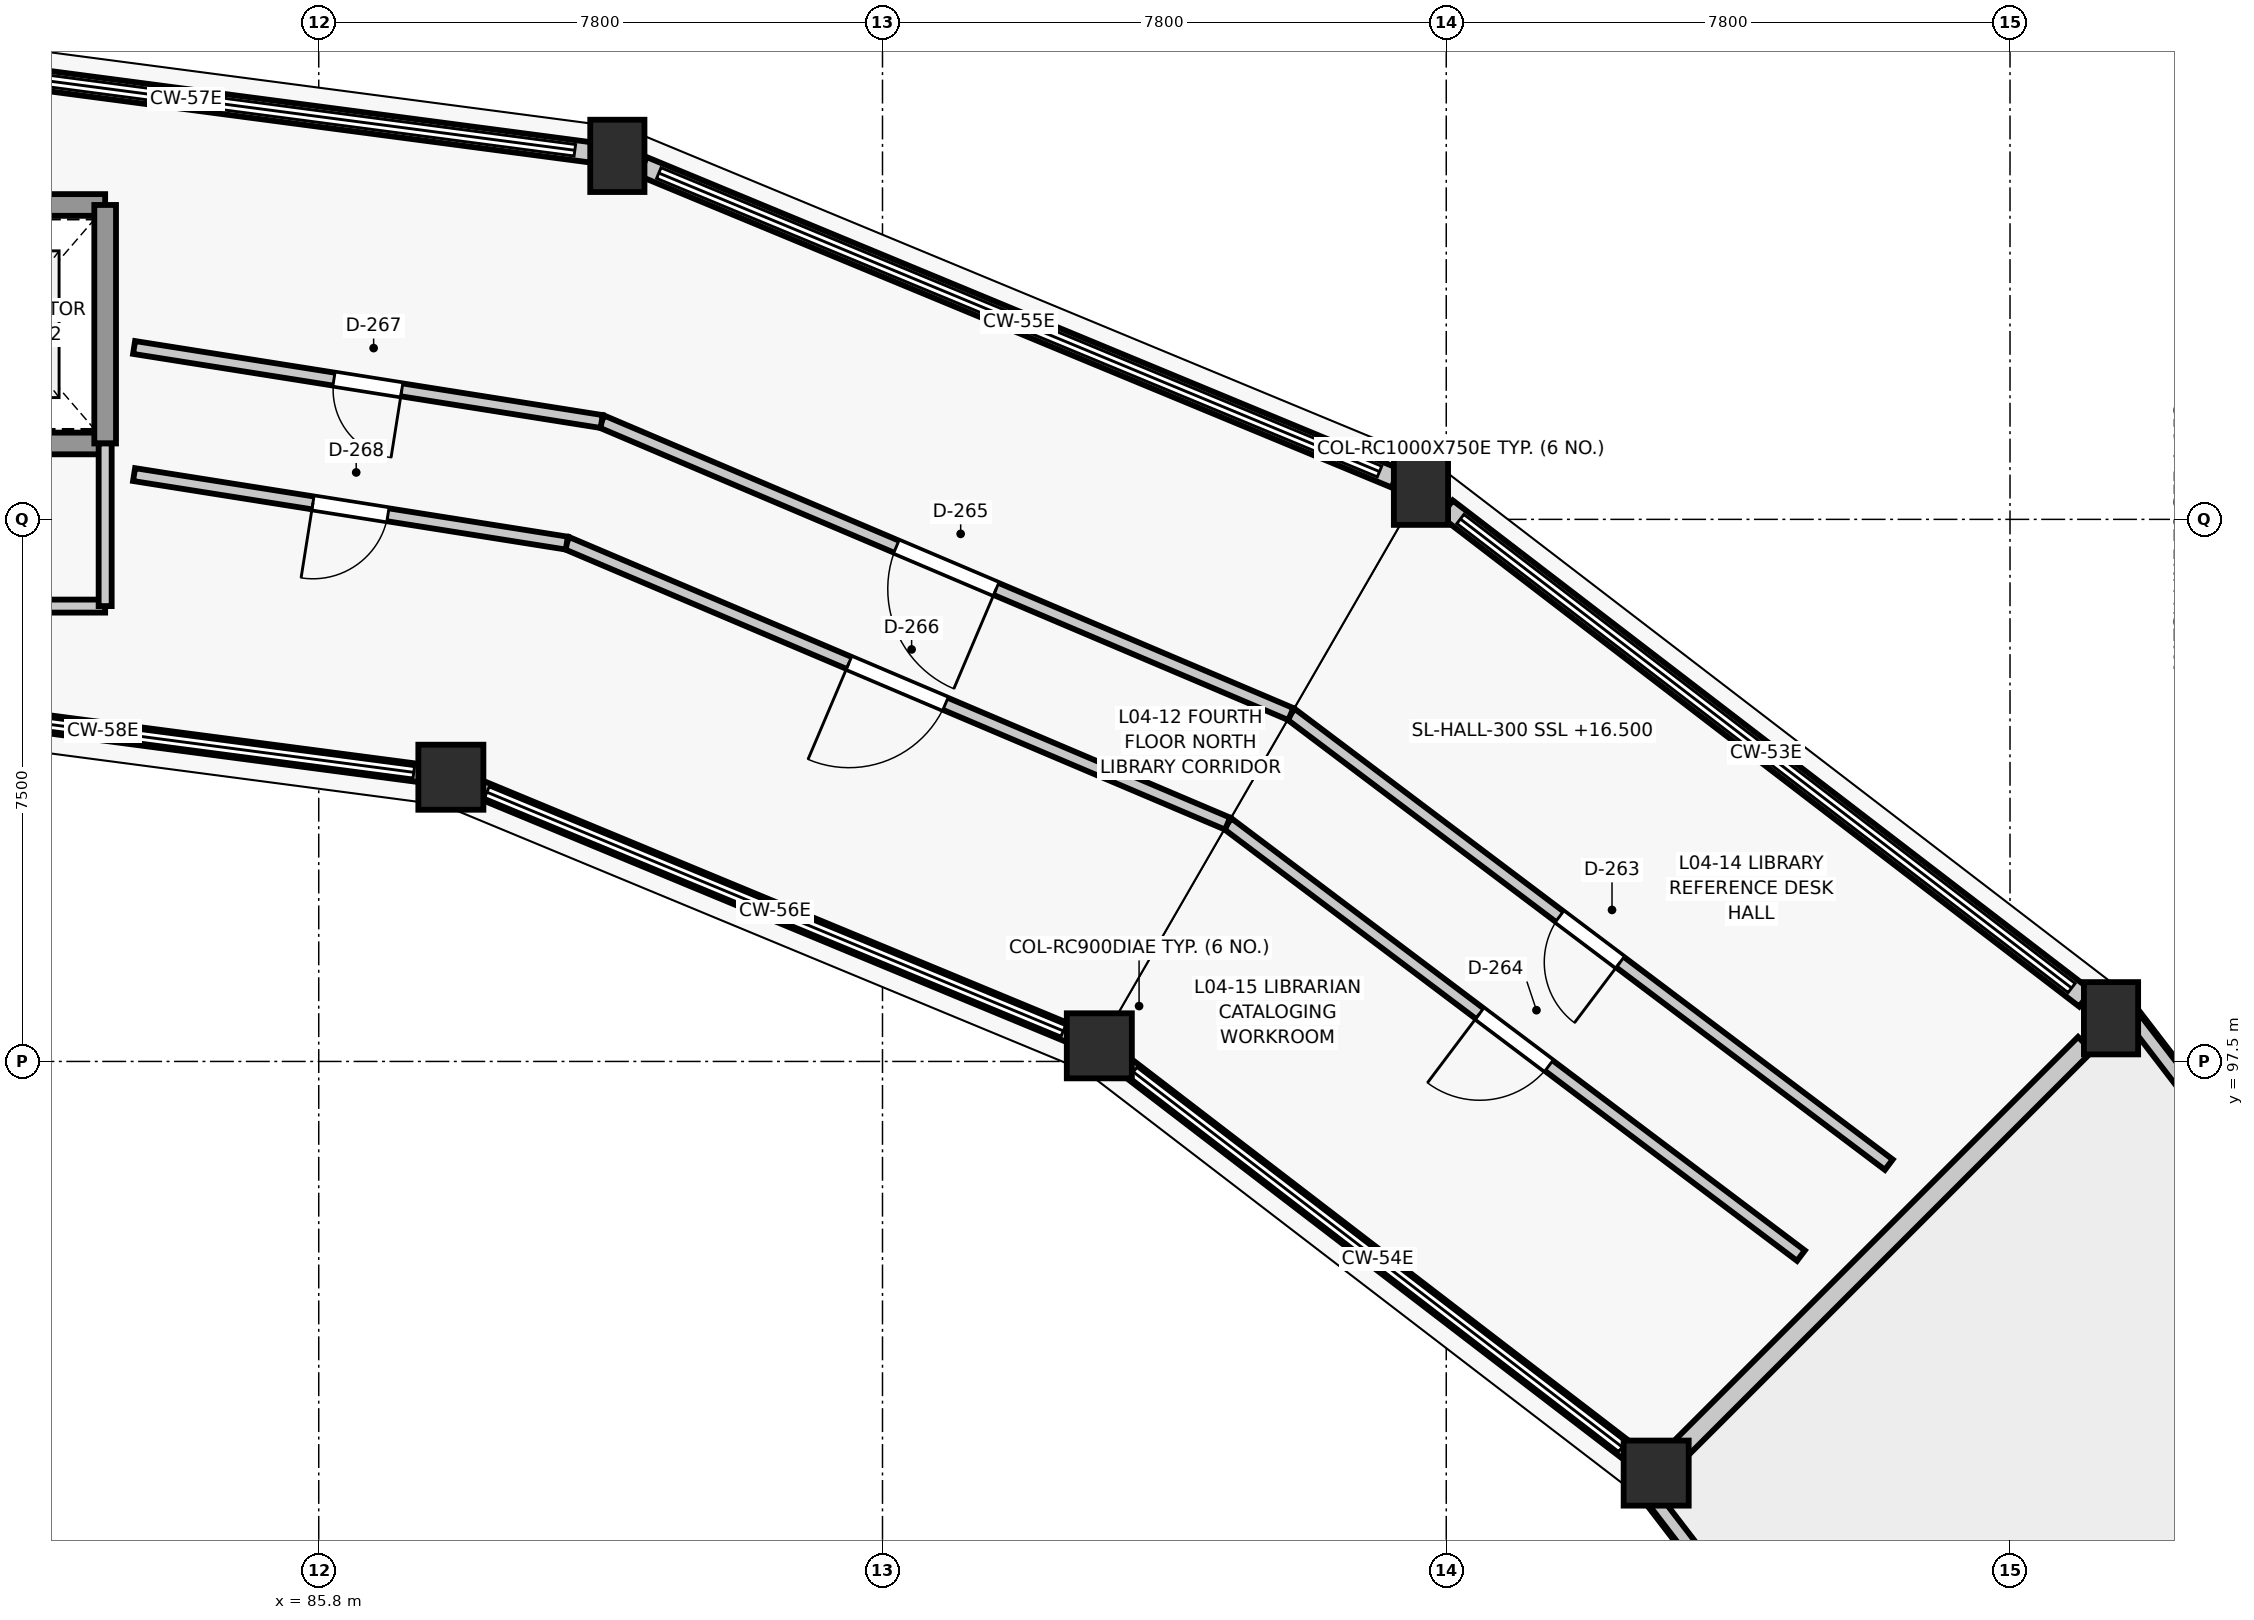
"""IFC4 building model, lengths in metres.
Left out: names, types, materials, properties, quantities, classifications, styles, units other than length and angle.
Written with IfcOpenShell. Run it as: python <this file> out.ifc"""

import sys

from ifc_helpers import new_model, si_unit, direction, frame, frame_2d, origin, origin_2d, place, context, subcontext, project, spatial, rectangle, circle, extrude, element, fill, save


model = new_model("IFC4")
c1 = context("Model", 3, precision=1e-05, world=origin(), true_north=direction((0.0, 1.0)))
c2 = subcontext(c1, "Body", "Model", "MODEL_VIEW")
j1 = project(units=[si_unit("LENGTHUNIT", "METRE"), si_unit("PLANEANGLEUNIT", "RADIAN")], contexts=[c1])
p1 = place(None, origin())
s1 = spatial("IfcSite", under=j1, at=p1, CompositionType="ELEMENT")
p2 = place(p1, origin())
s2 = spatial("IfcBuilding", under=s1, at=p2, CompositionType="ELEMENT")
p3 = place(p2, frame((0.0, 0.0, 16.5)))
s3 = spatial("IfcBuildingStorey", under=s2, at=p3, CompositionType="ELEMENT", Elevation=16.5)
for number, where, z_axis, x_axis in (
    (1, (96.6, 97.716, 0.0), (0.0, 0.0, 1.0), (1.0, 0.0, 0.0)),
    (2, (87.628, 101.432, 0.0), (0.0, 0.0, 1.0), (1.0, 0.0, 0.0)),
):
    element("IfcColumn", number, at=place(p3, frame(where, z_axis=z_axis, x_axis=x_axis)), inside=s3, PredefinedType="COLUMN", context=c2, shape_type="SweptSolid", body=[
        extrude(circle(Radius=0.45, at=origin_2d()), origin(), (0.0, 0.0, 1.0), 3.9),
    ])
for number, where, z_axis, x_axis in (
    (3, (101.05, 105.424, 0.0), (0.0, 0.0, 1.0), (1.0, 0.0, 0.0)),
    (4, (89.932, 110.029, 0.0), (0.0, 0.0, 1.0), (1.0, 0.0, 0.0)),
    (5, (110.598, 98.098, 0.0), (0.0, 0.0, 1.0), (1.0, 0.0, 0.0)),
):
    element("IfcColumn", number, at=place(p3, frame(where, z_axis=z_axis, x_axis=x_axis)), inside=s3, PredefinedType="COLUMN", context=c2, shape_type="SweptSolid", body=[
        extrude(rectangle(XDim=0.75, YDim=1.0, at=origin_2d()), origin(), (0.0, 0.0, 1.0), 3.9),
    ])
p4 = place(p3, frame((104.304, 91.804, 0.0), z_axis=(0.0, 0.0, 1.0), x_axis=(1.0, 0.0, 0.0)))
e6 = element("IfcColumn", 6, at=p4, inside=s3, PredefinedType="COLUMN", context=c2, shape_type="SweptSolid", body=[
    extrude(circle(Radius=0.45, at=origin_2d()), origin(), (0.0, 0.0, 1.0), 3.9),
])
p5 = place(p3, frame((101.405, 105.151, 0.0), z_axis=(0.0, 0.0, 1.0), x_axis=(0.793342066679, -0.608776120785, 0.0)))
e7 = element("IfcWall", 7, at=p5, inside=s3, PredefinedType="STANDARD", context=c2, shape_type="SweptSolid", body=[
    extrude(rectangle(XDim=11.139, YDim=0.28, at=frame_2d((5.57, 0.0))), origin(), (0.0, 0.0, 1.0), 0.82),
])
p6 = place(p3, frame((104.024, 92.019, 0.0), z_axis=(0.0, 0.0, 1.0), x_axis=(-0.793347085527, 0.608769580289, 0.0)))
e8 = element("IfcWall", 8, at=p6, inside=s3, PredefinedType="STANDARD", context=c2, shape_type="SweptSolid", body=[
    extrude(rectangle(XDim=9.005, YDim=0.25, at=frame_2d((4.502, 0.0))), origin(), (0.0, 0.0, 1.0), 0.82),
])
p7 = place(p3, frame((90.283, 109.883, 0.0), z_axis=(0.0, 0.0, 1.0), x_axis=(0.923883530636, -0.382673779896, 0.0)))
e9 = element("IfcWall", 9, at=p7, inside=s3, PredefinedType="STANDARD", context=c2, shape_type="SweptSolid", body=[
    extrude(rectangle(XDim=11.272, YDim=0.28, at=frame_2d((5.636, 0.0))), origin(), (0.0, 0.0, 1.0), 0.82),
])
p8 = place(p3, frame((96.323, 97.831, 0.0), z_axis=(0.0, 0.0, 1.0), x_axis=(-0.923880324771, 0.382681519675, 0.0)))
e10 = element("IfcWall", 10, at=p8, inside=s3, PredefinedType="STANDARD", context=c2, shape_type="SweptSolid", body=[
    extrude(rectangle(XDim=9.112, YDim=0.25, at=frame_2d((4.556, 0.0))), origin(), (0.0, 0.0, 1.0), 0.82),
])
p9 = place(p3, frame((78.35, 111.554, 0.0), z_axis=(0.0, 0.0, 1.0), x_axis=(0.991443215359, -0.130538694334, 0.0)))
e11 = element("IfcWall", 11, at=p9, inside=s3, PredefinedType="STANDARD", context=c2, shape_type="SweptSolid", body=[
    extrude(rectangle(XDim=11.328, YDim=0.28, at=frame_2d((5.664, 0.0))), origin(), (0.0, 0.0, 1.0), 0.82),
])
p10 = place(p3, frame((87.353, 101.469, 0.0), z_axis=(0.0, 0.0, 1.0), x_axis=(-0.991441766434, 0.130549698469, 0.0)))
e12 = element("IfcWall", 12, at=p10, inside=s3, PredefinedType="STANDARD", context=c2, shape_type="SweptSolid", body=[
    extrude(rectangle(XDim=9.156, YDim=0.25, at=frame_2d((4.578, 0.0))), origin(), (0.0, 0.0, 1.0), 0.82),
])
p11 = place(p3, frame((110.24, 97.74, 0.0), z_axis=(0.0, 0.0, 1.0), x_axis=(-0.707106781187, -0.707106781187, 0.0)))
e13 = element("IfcWall", 13, at=p11, inside=s3, PredefinedType="STANDARD", context=c2, shape_type="SweptSolid", body=[
    extrude(rectangle(XDim=7.995, YDim=0.28, at=frame_2d((3.998, 0.0))), origin(), (0.0, 0.0, 1.0), 2.997),
])
p12 = place(p3, frame((118.14, 88.675, 0.0), z_axis=(0.0, 0.0, 1.0), x_axis=(-0.608767399899, 0.79334875863, 0.0)))
e14 = element("IfcWall", 14, at=p12, inside=s3, PredefinedType="PARAPET", context=c2, shape_type="SweptSolid", body=[
    extrude(rectangle(XDim=12.1, YDim=0.2, at=frame_2d((6.05, 0.0))), origin(), (0.0, 0.0, 1.0), 1.12),
])
p13 = place(p3, frame((110.0, 83.975, 0.0), z_axis=(0.0, 0.0, 1.0), x_axis=(-0.608747657728, 0.793363907176, 0.0)))
e15 = element("IfcWall", 15, at=p13, inside=s3, PredefinedType="PARAPET", context=c2, shape_type="SweptSolid", body=[
    extrude(rectangle(XDim=9.646, YDim=0.2, at=frame_2d((4.823, 0.0))), origin(), (0.0, 0.0, 1.0), 1.12),
])
p14 = place(p3, frame((82.845, 106.05, 0.0), z_axis=(0.0, 0.0, 1.0), x_axis=(-1.0, 0.0, 0.0)))
e16 = element("IfcWall", 16, at=p14, inside=s3, PredefinedType="SHEAR", context=c2, shape_type="SweptSolid", body=[
    extrude(rectangle(XDim=9.69, YDim=0.3, at=frame_2d((4.845, 0.0))), origin(), (0.0, 0.0, 1.0), 3.9),
])
p15 = place(p14, frame((8.245, 0.0, 0.0)))
e17 = element("IfcOpeningElement", 17, at=p15, cuts=e16, PredefinedType="OPENING", context=c2, shape_type="SweptSolid", body=[
    extrude(rectangle(XDim=1.15, YDim=2.15, at=frame_2d((0.575, 1.075))), frame((0.0, 0.16, 0.0), z_axis=(0.0, -1.0, 0.0), x_axis=(1.0, 0.0, 0.0)), (0.0, 0.0, 1.0), 0.32),
])
p16 = place(p14, frame((0.85, 0.0, 0.0)))
e18 = element("IfcOpeningElement", 18, at=p16, cuts=e16, PredefinedType="OPENING", context=c2, shape_type="SweptSolid", body=[
    extrude(rectangle(XDim=1.1, YDim=2.15, at=frame_2d((0.55, 1.075))), frame((0.0, 0.16, 0.0), z_axis=(0.0, -1.0, 0.0), x_axis=(1.0, 0.0, 0.0)), (0.0, 0.0, 1.0), 0.32),
])
p17 = place(p3, frame((73.155, 109.35, 0.0), z_axis=(0.0, 0.0, 1.0), x_axis=(1.0, 0.0, 0.0)))
e19 = element("IfcWall", 19, at=p17, inside=s3, PredefinedType="SHEAR", context=c2, shape_type="SweptSolid", body=[
    extrude(rectangle(XDim=9.69, YDim=0.3, at=frame_2d((4.845, 0.0))), origin(), (0.0, 0.0, 1.0), 3.9),
])
p18 = place(p3, frame((82.845, 109.35, 0.0), z_axis=(0.0, 0.0, 1.0), x_axis=(0.0, -1.0, 0.0)))
e20 = element("IfcWall", 20, at=p18, inside=s3, PredefinedType="SHEAR", context=c2, shape_type="SweptSolid", body=[
    extrude(rectangle(XDim=3.3, YDim=0.3, at=frame_2d((1.65, 0.0))), origin(), (0.0, 0.0, 1.0), 3.9),
])
p19 = place(p3, frame((73.155, 103.8, 0.0), z_axis=(0.0, 0.0, 1.0), x_axis=(1.0, 0.0, 0.0)))
e21 = element("IfcWall", 21, at=p19, inside=s3, PredefinedType="PARTITIONING", context=c2, shape_type="SweptSolid", body=[
    extrude(rectangle(XDim=9.69, YDim=0.18, at=frame_2d((4.845, 0.0))), origin(), (0.0, 0.0, 1.0), 3.635),
])
p20 = place(p19, frame((1.1, 0.0, 0.0)))
e22 = element("IfcOpeningElement", 22, at=p20, cuts=e21, PredefinedType="OPENING", context=c2, shape_type="SweptSolid", body=[
    extrude(rectangle(XDim=1.5, YDim=2.15, at=frame_2d((0.75, 1.075))), frame((0.0, 0.1, 0.0), z_axis=(0.0, -1.0, 0.0), x_axis=(1.0, 0.0, 0.0)), (0.0, 0.0, 1.0), 0.2),
])
p21 = place(p3, frame((82.845, 106.05, 0.0), z_axis=(0.0, 0.0, 1.0), x_axis=(0.0, -1.0, 0.0)))
e23 = element("IfcWall", 23, at=p21, inside=s3, PredefinedType="PARTITIONING", context=c2, shape_type="SweptSolid", body=[
    extrude(rectangle(XDim=2.25, YDim=0.18, at=frame_2d((1.125, 0.0))), origin(), (0.0, 0.0, 1.0), 3.635),
])
p22 = place(p3, frame((107.523, 96.072, 0.0), z_axis=(0.0, 0.0, 1.0), x_axis=(-0.798634745904, 0.601816037203, 0.0)))
e24 = element("IfcWall", 24, at=p22, inside=s3, PredefinedType="PARTITIONING", context=c2, shape_type="SweptSolid", body=[
    extrude(rectangle(XDim=10.359, YDim=0.18, at=frame_2d((5.179, 0.0))), origin(), (0.0, 0.0, 1.0), 3.635),
])
p23 = place(p22, frame((4.655, 0.0, 0.0)))
e25 = element("IfcOpeningElement", 25, at=p23, cuts=e24, PredefinedType="OPENING", context=c2, shape_type="SweptSolid", body=[
    extrude(rectangle(XDim=1.05, YDim=2.1, at=frame_2d((0.525, 1.05))), frame((0.0, 0.1, 0.0), z_axis=(0.0, -1.0, 0.0), x_axis=(1.0, 0.0, 0.0)), (0.0, 0.0, 1.0), 0.2),
])
p24 = place(p3, frame((106.307, 94.813, 0.0), z_axis=(0.0, 0.0, 1.0), x_axis=(-0.798632256967, 0.601819340112, 0.0)))
e26 = element("IfcWall", 26, at=p24, inside=s3, PredefinedType="PARTITIONING", context=c2, shape_type="SweptSolid", body=[
    extrude(rectangle(XDim=9.932, YDim=0.18, at=frame_2d((4.966, 0.0))), origin(), (0.0, 0.0, 1.0), 3.635),
])
p25 = place(p24, frame((4.366, 0.0, 0.0)))
e27 = element("IfcOpeningElement", 27, at=p25, cuts=e26, PredefinedType="OPENING", context=c2, shape_type="SweptSolid", body=[
    extrude(rectangle(XDim=1.2, YDim=2.15, at=frame_2d((0.6, 1.075))), frame((0.0, 0.1, 0.0), z_axis=(0.0, -1.0, 0.0), x_axis=(1.0, 0.0, 0.0)), (0.0, 0.0, 1.0), 0.2),
])
p26 = place(p3, frame((99.25, 102.306, 0.0), z_axis=(0.0, 0.0, 1.0), x_axis=(-0.920510896456, 0.390716891759, 0.0)))
e28 = element("IfcWall", 28, at=p26, inside=s3, PredefinedType="PARTITIONING", context=c2, shape_type="SweptSolid", body=[
    extrude(rectangle(XDim=10.359, YDim=0.18, at=frame_2d((5.179, 0.0))), origin(), (0.0, 0.0, 1.0), 3.635),
])
p27 = place(p26, frame((4.429, 0.0, 0.0)))
e29 = element("IfcOpeningElement", 29, at=p27, cuts=e28, PredefinedType="OPENING", context=c2, shape_type="SweptSolid", body=[
    extrude(rectangle(XDim=1.5, YDim=2.15, at=frame_2d((0.75, 1.075))), frame((0.0, 0.1, 0.0), z_axis=(0.0, -1.0, 0.0), x_axis=(1.0, 0.0, 0.0)), (0.0, 0.0, 1.0), 0.2),
])
p28 = place(p3, frame((98.375, 100.791, 0.0), z_axis=(0.0, 0.0, 1.0), x_axis=(-0.920506244917, 0.390727850388, 0.0)))
e30 = element("IfcWall", 30, at=p28, inside=s3, PredefinedType="PARTITIONING", context=c2, shape_type="SweptSolid", body=[
    extrude(rectangle(XDim=9.932, YDim=0.18, at=frame_2d((4.966, 0.0))), origin(), (0.0, 0.0, 1.0), 3.635),
])
p29 = place(p28, frame((4.241, 0.0, 0.0)))
e31 = element("IfcOpeningElement", 31, at=p29, cuts=e30, PredefinedType="OPENING", context=c2, shape_type="SweptSolid", body=[
    extrude(rectangle(XDim=1.45, YDim=2.2, at=frame_2d((0.725, 1.1))), frame((0.0, 0.1, 0.0), z_axis=(0.0, -1.0, 0.0), x_axis=(1.0, 0.0, 0.0)), (0.0, 0.0, 1.0), 0.2),
])
p30 = place(p3, frame((89.715, 106.354, 0.0), z_axis=(0.0, 0.0, 1.0), x_axis=(-0.987682749699, 0.15646976049, 0.0)))
e32 = element("IfcWall", 32, at=p30, inside=s3, PredefinedType="PARTITIONING", context=c2, shape_type="SweptSolid", body=[
    extrude(rectangle(XDim=6.55, YDim=0.18, at=frame_2d((3.275, 0.0))), origin(), (0.0, 0.0, 1.0), 3.635),
])
p31 = place(p30, frame((2.8, 0.0, 0.0)))
e33 = element("IfcOpeningElement", 33, at=p31, cuts=e32, PredefinedType="OPENING", context=c2, shape_type="SweptSolid", body=[
    extrude(rectangle(XDim=0.95, YDim=2.1, at=frame_2d((0.475, 1.05))), frame((0.0, 0.1, 0.0), z_axis=(0.0, -1.0, 0.0), x_axis=(1.0, 0.0, 0.0)), (0.0, 0.0, 1.0), 0.2),
])
p32 = place(p3, frame((89.232, 104.671, 0.0), z_axis=(0.0, 0.0, 1.0), x_axis=(-0.987688724115, 0.15643204357, 0.0)))
e34 = element("IfcWall", 34, at=p32, inside=s3, PredefinedType="PARTITIONING", context=c2, shape_type="SweptSolid", body=[
    extrude(rectangle(XDim=6.062, YDim=0.18, at=frame_2d((3.031, 0.0))), origin(), (0.0, 0.0, 1.0), 3.635),
])
p33 = place(p32, frame((2.506, 0.0, 0.0)))
e35 = element("IfcOpeningElement", 35, at=p33, cuts=e34, PredefinedType="OPENING", context=c2, shape_type="SweptSolid", body=[
    extrude(rectangle(XDim=1.05, YDim=2.1, at=frame_2d((0.525, 1.05))), frame((0.0, 0.1, 0.0), z_axis=(0.0, -1.0, 0.0), x_axis=(1.0, 0.0, 0.0)), (0.0, 0.0, 1.0), 0.2),
])
p34 = place(p23, origin())
e36 = element("IfcDoor", 36, at=p34, inside=s3, OperationType="SINGLE_SWING_LEFT", PredefinedType="DOOR", context=c2, shape_type="SweptSolid", body=[
    extrude(rectangle(XDim=1.05, YDim=2.1, at=frame_2d((0.525, 1.05))), frame((0.0, 0.025, 0.0), z_axis=(0.0, -1.0, 0.0), x_axis=(1.0, 0.0, 0.0)), (0.0, 0.0, 1.0), 0.05),
])
fill(e25, e36)
p35 = place(p25, origin())
e37 = element("IfcDoor", 37, at=p35, inside=s3, OperationType="SINGLE_SWING_RIGHT", PredefinedType="DOOR", context=c2, shape_type="SweptSolid", body=[
    extrude(rectangle(XDim=1.2, YDim=2.15, at=frame_2d((0.6, 1.075))), frame((0.0, 0.025, 0.0), z_axis=(0.0, -1.0, 0.0), x_axis=(1.0, 0.0, 0.0)), (0.0, 0.0, 1.0), 0.05),
])
fill(e27, e37)
p36 = place(p27, origin())
e38 = element("IfcDoor", 38, at=p36, inside=s3, OperationType="SINGLE_SWING_LEFT", PredefinedType="DOOR", context=c2, shape_type="SweptSolid", body=[
    extrude(rectangle(XDim=1.5, YDim=2.15, at=frame_2d((0.75, 1.075))), frame((0.0, 0.025, 0.0), z_axis=(0.0, -1.0, 0.0), x_axis=(1.0, 0.0, 0.0)), (0.0, 0.0, 1.0), 0.05),
])
fill(e29, e38)
p37 = place(p29, origin())
e39 = element("IfcDoor", 39, at=p37, inside=s3, OperationType="SINGLE_SWING_RIGHT", PredefinedType="DOOR", context=c2, shape_type="SweptSolid", body=[
    extrude(rectangle(XDim=1.45, YDim=2.2, at=frame_2d((0.725, 1.1))), frame((0.0, 0.025, 0.0), z_axis=(0.0, -1.0, 0.0), x_axis=(1.0, 0.0, 0.0)), (0.0, 0.0, 1.0), 0.05),
])
fill(e31, e39)
p38 = place(p31, origin())
e40 = element("IfcDoor", 40, at=p38, inside=s3, OperationType="SINGLE_SWING_LEFT", PredefinedType="DOOR", context=c2, shape_type="SweptSolid", body=[
    extrude(rectangle(XDim=0.95, YDim=2.1, at=frame_2d((0.475, 1.05))), frame((0.0, 0.025, 0.0), z_axis=(0.0, -1.0, 0.0), x_axis=(1.0, 0.0, 0.0)), (0.0, 0.0, 1.0), 0.05),
])
fill(e33, e40)
p39 = place(p33, origin())
e41 = element("IfcDoor", 41, at=p39, inside=s3, OperationType="SINGLE_SWING_RIGHT", PredefinedType="DOOR", context=c2, shape_type="SweptSolid", body=[
    extrude(rectangle(XDim=1.05, YDim=2.1, at=frame_2d((0.525, 1.05))), frame((0.0, 0.025, 0.0), z_axis=(0.0, -1.0, 0.0), x_axis=(1.0, 0.0, 0.0)), (0.0, 0.0, 1.0), 0.05),
])
fill(e35, e41)
save(model, sys.argv[1])
